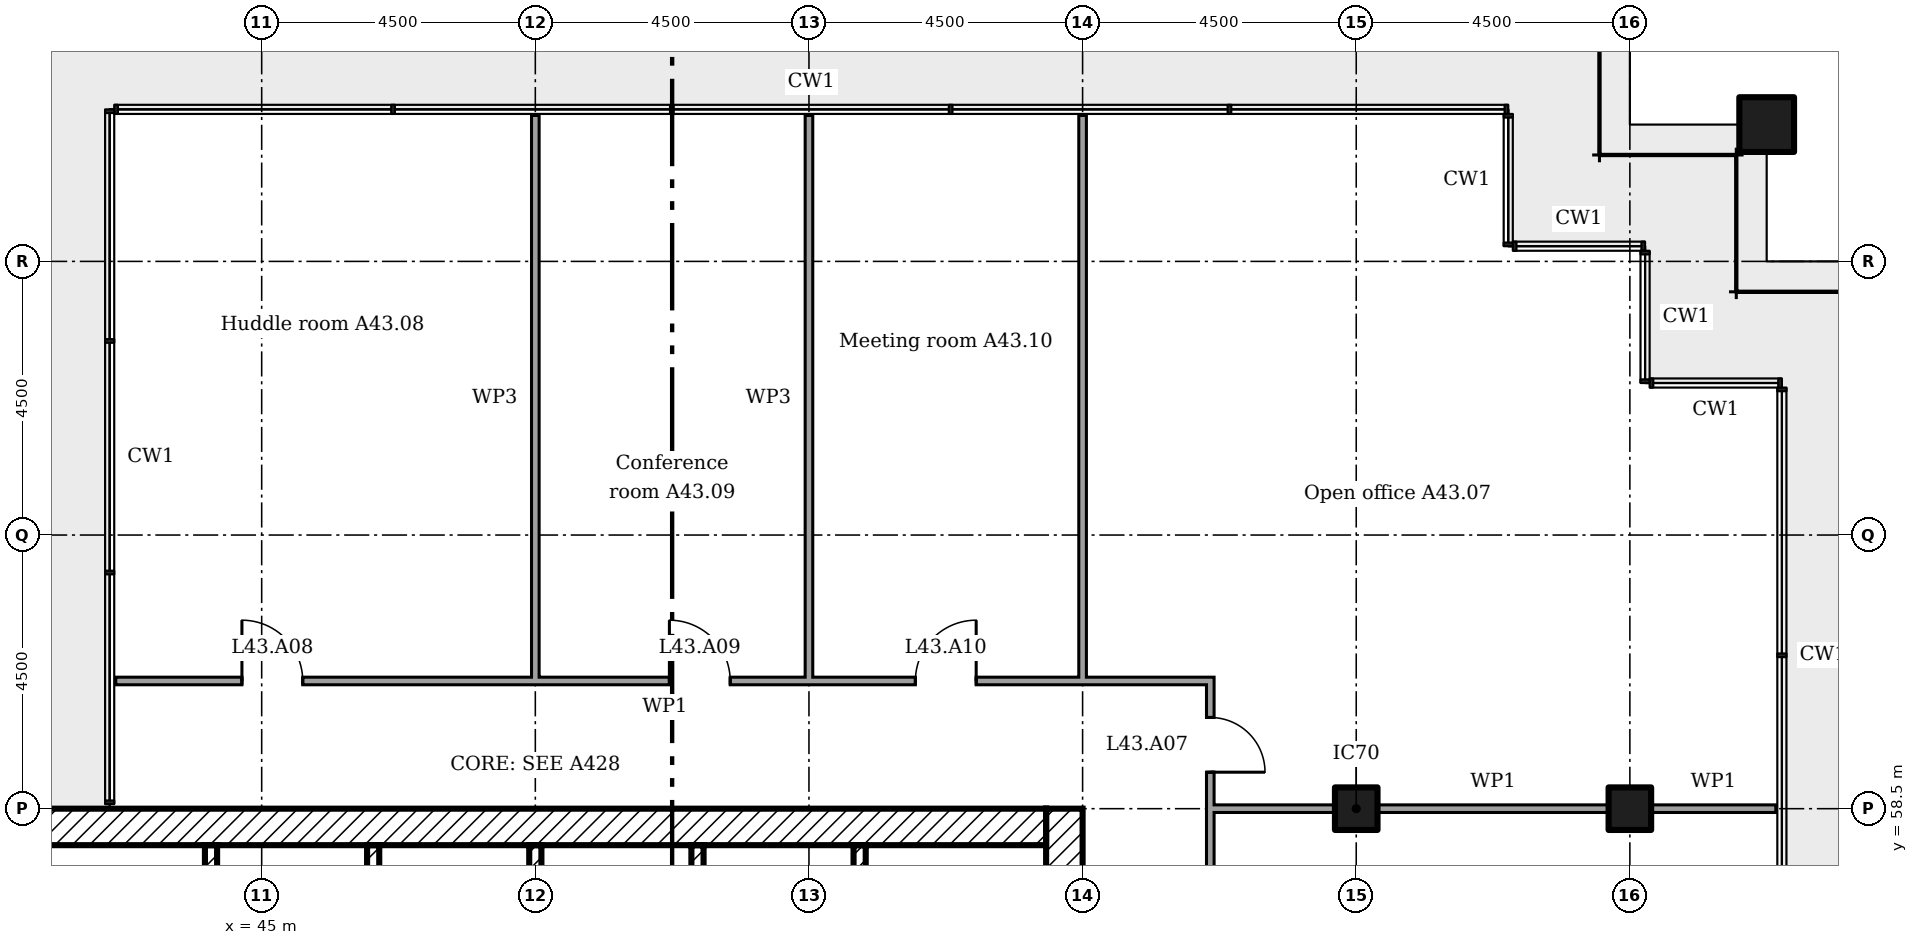
"""IFC4 building model, lengths in metres.
Left out: names, types, materials, properties, quantities, classifications, styles, units other than length and angle.
Written with IfcOpenShell. Run it as: python <this file> out.ifc"""

import sys

from ifc_helpers import new_model, si_unit, direction, frame, frame_2d, origin, origin_2d, place, context, subcontext, project, spatial, rectangle, extrude, element, fill, save


model = new_model("IFC4")
c1 = context("Model", 3, precision=1e-05, world=origin(), true_north=direction((0.0, 1.0)))
c2 = subcontext(c1, "Body", "Model", "MODEL_VIEW")
j1 = project(units=[si_unit("LENGTHUNIT", "METRE"), si_unit("PLANEANGLEUNIT", "RADIAN")], contexts=[c1])
p1 = place(None, origin())
s1 = spatial("IfcSite", under=j1, at=p1, CompositionType="ELEMENT")
p2 = place(p1, origin())
s2 = spatial("IfcBuilding", under=s1, at=p2, CompositionType="ELEMENT")
p3 = place(p2, frame((0.0, 0.0, 172.6)))
s3 = spatial("IfcBuildingStorey", under=s2, at=p3, CompositionType="ELEMENT", Elevation=172.6)
p4 = place(p3, frame((69.75, 69.75, 0.0)))
e1 = element("IfcColumn", 1, at=p4, inside=s3, PredefinedType="COLUMN", context=c2, shape_type="SweptSolid", body=[
    extrude(rectangle(XDim=0.9, YDim=0.9, at=origin_2d()), origin(), (0.0, 0.0, 1.0), 3.6),
])
for number, where in (
    (2, (63.0, 58.5, 0.0)),
    (3, (67.5, 58.5, 0.0)),
):
    element("IfcColumn", number, at=place(p3, frame(where)), inside=s3, PredefinedType="COLUMN", context=c2, shape_type="SweptSolid", body=[
        extrude(rectangle(XDim=0.7, YDim=0.7, at=origin_2d()), origin(), (0.0, 0.0, 1.0), 3.6),
    ])
p5 = place(p3, frame((58.2, 40.5, 0.0), z_axis=(0.0, 0.0, 1.0), x_axis=(0.0, 1.0, 0.0)))
e4 = element("IfcWall", 4, at=p5, inside=s3, PredefinedType="SHEAR", context=c2, shape_type="SweptSolid", body=[
    extrude(rectangle(XDim=18.0, YDim=0.6, at=frame_2d((9.0, 0.0))), origin(), (0.0, 0.0, 1.0), 3.35),
])
p6 = place(p5, frame((13.15, 0.0, 0.0)))
e5 = element("IfcOpeningElement", 5, at=p6, cuts=e4, PredefinedType="OPENING", context=c2, shape_type="SweptSolid", body=[
    extrude(rectangle(XDim=1.2, YDim=2.1, at=frame_2d((0.6, 1.05))), frame((0.0, 0.31, 0.0), z_axis=(0.0, -1.0, 0.0), x_axis=(1.0, 0.0, 0.0)), (0.0, 0.0, 1.0), 0.62),
])
p7 = place(p5, frame((3.9, 0.0, 0.0)))
e6 = element("IfcOpeningElement", 6, at=p7, cuts=e4, PredefinedType="OPENING", context=c2, shape_type="SweptSolid", body=[
    extrude(rectangle(XDim=1.8, YDim=2.1, at=frame_2d((0.9, 1.05))), frame((0.0, 0.31, 0.0), z_axis=(0.0, -1.0, 0.0), x_axis=(1.0, 0.0, 0.0)), (0.0, 0.0, 1.0), 0.62),
])
p8 = place(p5, frame((11.525, 0.0, 0.0)))
e7 = element("IfcOpeningElement", 7, at=p8, cuts=e4, PredefinedType="OPENING", context=c2, shape_type="SweptSolid", body=[
    extrude(rectangle(XDim=1.0, YDim=2.1, at=frame_2d((0.5, 1.05))), frame((0.0, 0.31, 0.0), z_axis=(0.0, -1.0, 0.0), x_axis=(1.0, 0.0, 0.0)), (0.0, 0.0, 1.0), 0.62),
])
p9 = place(p3, frame((40.5, 58.2, 0.0)))
e8 = element("IfcWall", 8, at=p9, inside=s3, PredefinedType="SHEAR", context=c2, shape_type="SweptSolid", body=[
    extrude(rectangle(XDim=17.4, YDim=0.6, at=frame_2d((8.7, 0.0))), origin(), (0.0, 0.0, 1.0), 3.35),
])
p10 = place(p3, frame((44.167, 57.9, 0.0), z_axis=(0.0, 0.0, 1.0), x_axis=(0.0, -1.0, 0.0)))
e9 = element("IfcWall", 9, at=p10, inside=s3, PredefinedType="SHEAR", context=c2, shape_type="SweptSolid", body=[
    extrude(rectangle(XDim=3.5, YDim=0.2, at=frame_2d((1.75, 0.0))), origin(), (0.0, 0.0, 1.0), 3.35),
])
p11 = place(p3, frame((46.833, 57.9, 0.0), z_axis=(0.0, 0.0, 1.0), x_axis=(0.0, -1.0, 0.0)))
e10 = element("IfcWall", 10, at=p11, inside=s3, PredefinedType="SHEAR", context=c2, shape_type="SweptSolid", body=[
    extrude(rectangle(XDim=4.6, YDim=0.2, at=frame_2d((2.3, 0.0))), origin(), (0.0, 0.0, 1.0), 3.35),
])
for number, where, z_axis, x_axis in (
    (11, (49.5, 57.9, 0.0), (0.0, 0.0, 1.0), (0.0, -1.0, 0.0)),
    (12, (52.167, 57.9, 0.0), (0.0, 0.0, 1.0), (0.0, -1.0, 0.0)),
    (13, (54.833, 57.9, 0.0), (0.0, 0.0, 1.0), (0.0, -1.0, 0.0)),
):
    element("IfcWall", number, at=place(p3, frame(where, z_axis=z_axis, x_axis=x_axis)), inside=s3, PredefinedType="SHEAR", context=c2, shape_type="SweptSolid", body=[
        extrude(rectangle(XDim=2.7, YDim=0.2, at=frame_2d((1.35, 0.0))), origin(), (0.0, 0.0, 1.0), 3.35),
    ])
p12 = place(p3, frame((60.6, 58.5, 0.0)))
e14 = element("IfcWall", 14, at=p12, inside=s3, PredefinedType="PARTITIONING", context=c2, shape_type="SweptSolid", body=[
    extrude(rectangle(XDim=2.05, YDim=0.125, at=frame_2d((1.025, 0.0))), origin(), (0.0, 0.0, 1.0), 2.676),
])
p13 = place(p3, frame((63.35, 58.5, 0.0)))
e15 = element("IfcWall", 15, at=p13, inside=s3, PredefinedType="PARTITIONING", context=c2, shape_type="SweptSolid", body=[
    extrude(rectangle(XDim=3.8, YDim=0.125, at=frame_2d((1.9, 0.0))), origin(), (0.0, 0.0, 1.0), 2.676),
])
p14 = place(p3, frame((67.85, 58.5, 0.0)))
e16 = element("IfcWall", 16, at=p14, inside=s3, PredefinedType="PARTITIONING", context=c2, shape_type="SweptSolid", body=[
    extrude(rectangle(XDim=2.05, YDim=0.125, at=frame_2d((1.025, 0.0))), origin(), (0.0, 0.0, 1.0), 2.676),
])
p15 = place(p3, frame((42.6, 60.6, 0.0)))
e17 = element("IfcWall", 17, at=p15, inside=s3, PredefinedType="PARTITIONING", context=c2, shape_type="SweptSolid", body=[
    extrude(rectangle(XDim=18.062, YDim=0.125, at=frame_2d((9.031, 0.0))), origin(), (0.0, 0.0, 1.0), 3.45),
])
p16 = place(p15, frame((2.075, 0.0, 0.0)))
e18 = element("IfcOpeningElement", 18, at=p16, cuts=e17, PredefinedType="OPENING", context=c2, shape_type="SweptSolid", body=[
    extrude(rectangle(XDim=1.0, YDim=2.1, at=frame_2d((0.5, 1.05))), frame((0.0, 0.073, 0.0), z_axis=(0.0, -1.0, 0.0), x_axis=(1.0, 0.0, 0.0)), (0.0, 0.0, 1.0), 0.145),
])
p17 = place(p15, frame((9.105, 0.0, 0.0)))
e19 = element("IfcOpeningElement", 19, at=p17, cuts=e17, PredefinedType="OPENING", context=c2, shape_type="SweptSolid", body=[
    extrude(rectangle(XDim=1.0, YDim=2.1, at=frame_2d((0.5, 1.05))), frame((0.0, 0.073, 0.0), z_axis=(0.0, -1.0, 0.0), x_axis=(1.0, 0.0, 0.0)), (0.0, 0.0, 1.0), 0.145),
])
p18 = place(p15, frame((13.15, 0.0, 0.0)))
e20 = element("IfcOpeningElement", 20, at=p18, cuts=e17, PredefinedType="OPENING", context=c2, shape_type="SweptSolid", body=[
    extrude(rectangle(XDim=1.0, YDim=2.1, at=frame_2d((0.5, 1.05))), frame((0.0, 0.073, 0.0), z_axis=(0.0, -1.0, 0.0), x_axis=(1.0, 0.0, 0.0)), (0.0, 0.0, 1.0), 0.145),
])
for number, where, z_axis, x_axis in (
    (21, (49.5, 60.6, 0.0), (0.0, 0.0, 1.0), (0.0, 1.0, 0.0)),
    (22, (54.0, 60.6, 0.0), (0.0, 0.0, 1.0), (0.0, 1.0, 0.0)),
):
    element("IfcWall", number, at=place(p3, frame(where, z_axis=z_axis, x_axis=x_axis)), inside=s3, PredefinedType="MOVABLE", context=c2, shape_type="SweptSolid", body=[
        extrude(rectangle(XDim=9.3, YDim=0.125, at=frame_2d((4.65, 0.0))), origin(), (0.0, 0.0, 1.0), 2.766),
    ])
p19 = place(p3, frame((58.5, 60.6, 0.0), z_axis=(0.0, 0.0, 1.0), x_axis=(0.0, 1.0, 0.0)))
e23 = element("IfcWall", 23, at=p19, inside=s3, PredefinedType="PARTITIONING", context=c2, shape_type="SweptSolid", body=[
    extrude(rectangle(XDim=9.3, YDim=0.125, at=frame_2d((4.65, 0.0))), origin(), (0.0, 0.0, 1.0), 2.766),
])
p20 = place(p3, frame((60.6, 50.762, 0.0), z_axis=(0.0, 0.0, 1.0), x_axis=(0.0, 1.0, 0.0)))
e24 = element("IfcWall", 24, at=p20, inside=s3, PredefinedType="PARTITIONING", context=c2, shape_type="SweptSolid", body=[
    extrude(rectangle(XDim=9.775, YDim=0.125, at=frame_2d((4.888, 0.0))), origin(), (0.0, 0.0, 1.0), 3.45),
])
p21 = place(p20, frame((8.337, 0.0, 0.0)))
e25 = element("IfcOpeningElement", 25, at=p21, cuts=e24, PredefinedType="OPENING", context=c2, shape_type="SweptSolid", body=[
    extrude(rectangle(XDim=0.9, YDim=2.1, at=frame_2d((0.45, 1.05))), frame((0.0, 0.073, 0.0), z_axis=(0.0, -1.0, 0.0), x_axis=(1.0, 0.0, 0.0)), (0.0, 0.0, 1.0), 0.145),
])
p22 = place(p21, frame((0.9, 0.0, 0.0), x_axis=(-1.0, 0.0, 0.0)))
e26 = element("IfcDoor", 26, at=p22, inside=s3, OperationType="SINGLE_SWING_LEFT", PredefinedType="DOOR", context=c2, shape_type="SweptSolid", body=[
    extrude(rectangle(XDim=0.9, YDim=2.1, at=frame_2d((0.45, 1.05))), frame((0.0, 0.025, 0.0), z_axis=(0.0, -1.0, 0.0), x_axis=(1.0, 0.0, 0.0)), (0.0, 0.0, 1.0), 0.05),
])
fill(e25, e26)
p23 = place(p16, origin())
e27 = element("IfcDoor", 27, at=p23, inside=s3, OperationType="SINGLE_SWING_RIGHT", PredefinedType="DOOR", context=c2, shape_type="SweptSolid", body=[
    extrude(rectangle(XDim=1.0, YDim=2.1, at=frame_2d((0.5, 1.05))), frame((0.0, 0.025, 0.0), z_axis=(0.0, -1.0, 0.0), x_axis=(1.0, 0.0, 0.0)), (0.0, 0.0, 1.0), 0.05),
])
fill(e18, e27)
p24 = place(p17, origin())
e28 = element("IfcDoor", 28, at=p24, inside=s3, OperationType="SINGLE_SWING_RIGHT", PredefinedType="DOOR", context=c2, shape_type="SweptSolid", body=[
    extrude(rectangle(XDim=1.0, YDim=2.1, at=frame_2d((0.5, 1.05))), frame((0.0, 0.025, 0.0), z_axis=(0.0, -1.0, 0.0), x_axis=(1.0, 0.0, 0.0)), (0.0, 0.0, 1.0), 0.05),
])
fill(e19, e28)
p25 = place(p18, origin())
e29 = element("IfcDoor", 29, at=p25, inside=s3, OperationType="SINGLE_SWING_LEFT", PredefinedType="DOOR", context=c2, shape_type="SweptSolid", body=[
    extrude(rectangle(XDim=1.0, YDim=2.1, at=frame_2d((0.5, 1.05))), frame((0.0, 0.025, 0.0), z_axis=(0.0, -1.0, 0.0), x_axis=(1.0, 0.0, 0.0)), (0.0, 0.0, 1.0), 0.05),
])
fill(e20, e29)
save(model, sys.argv[1])
